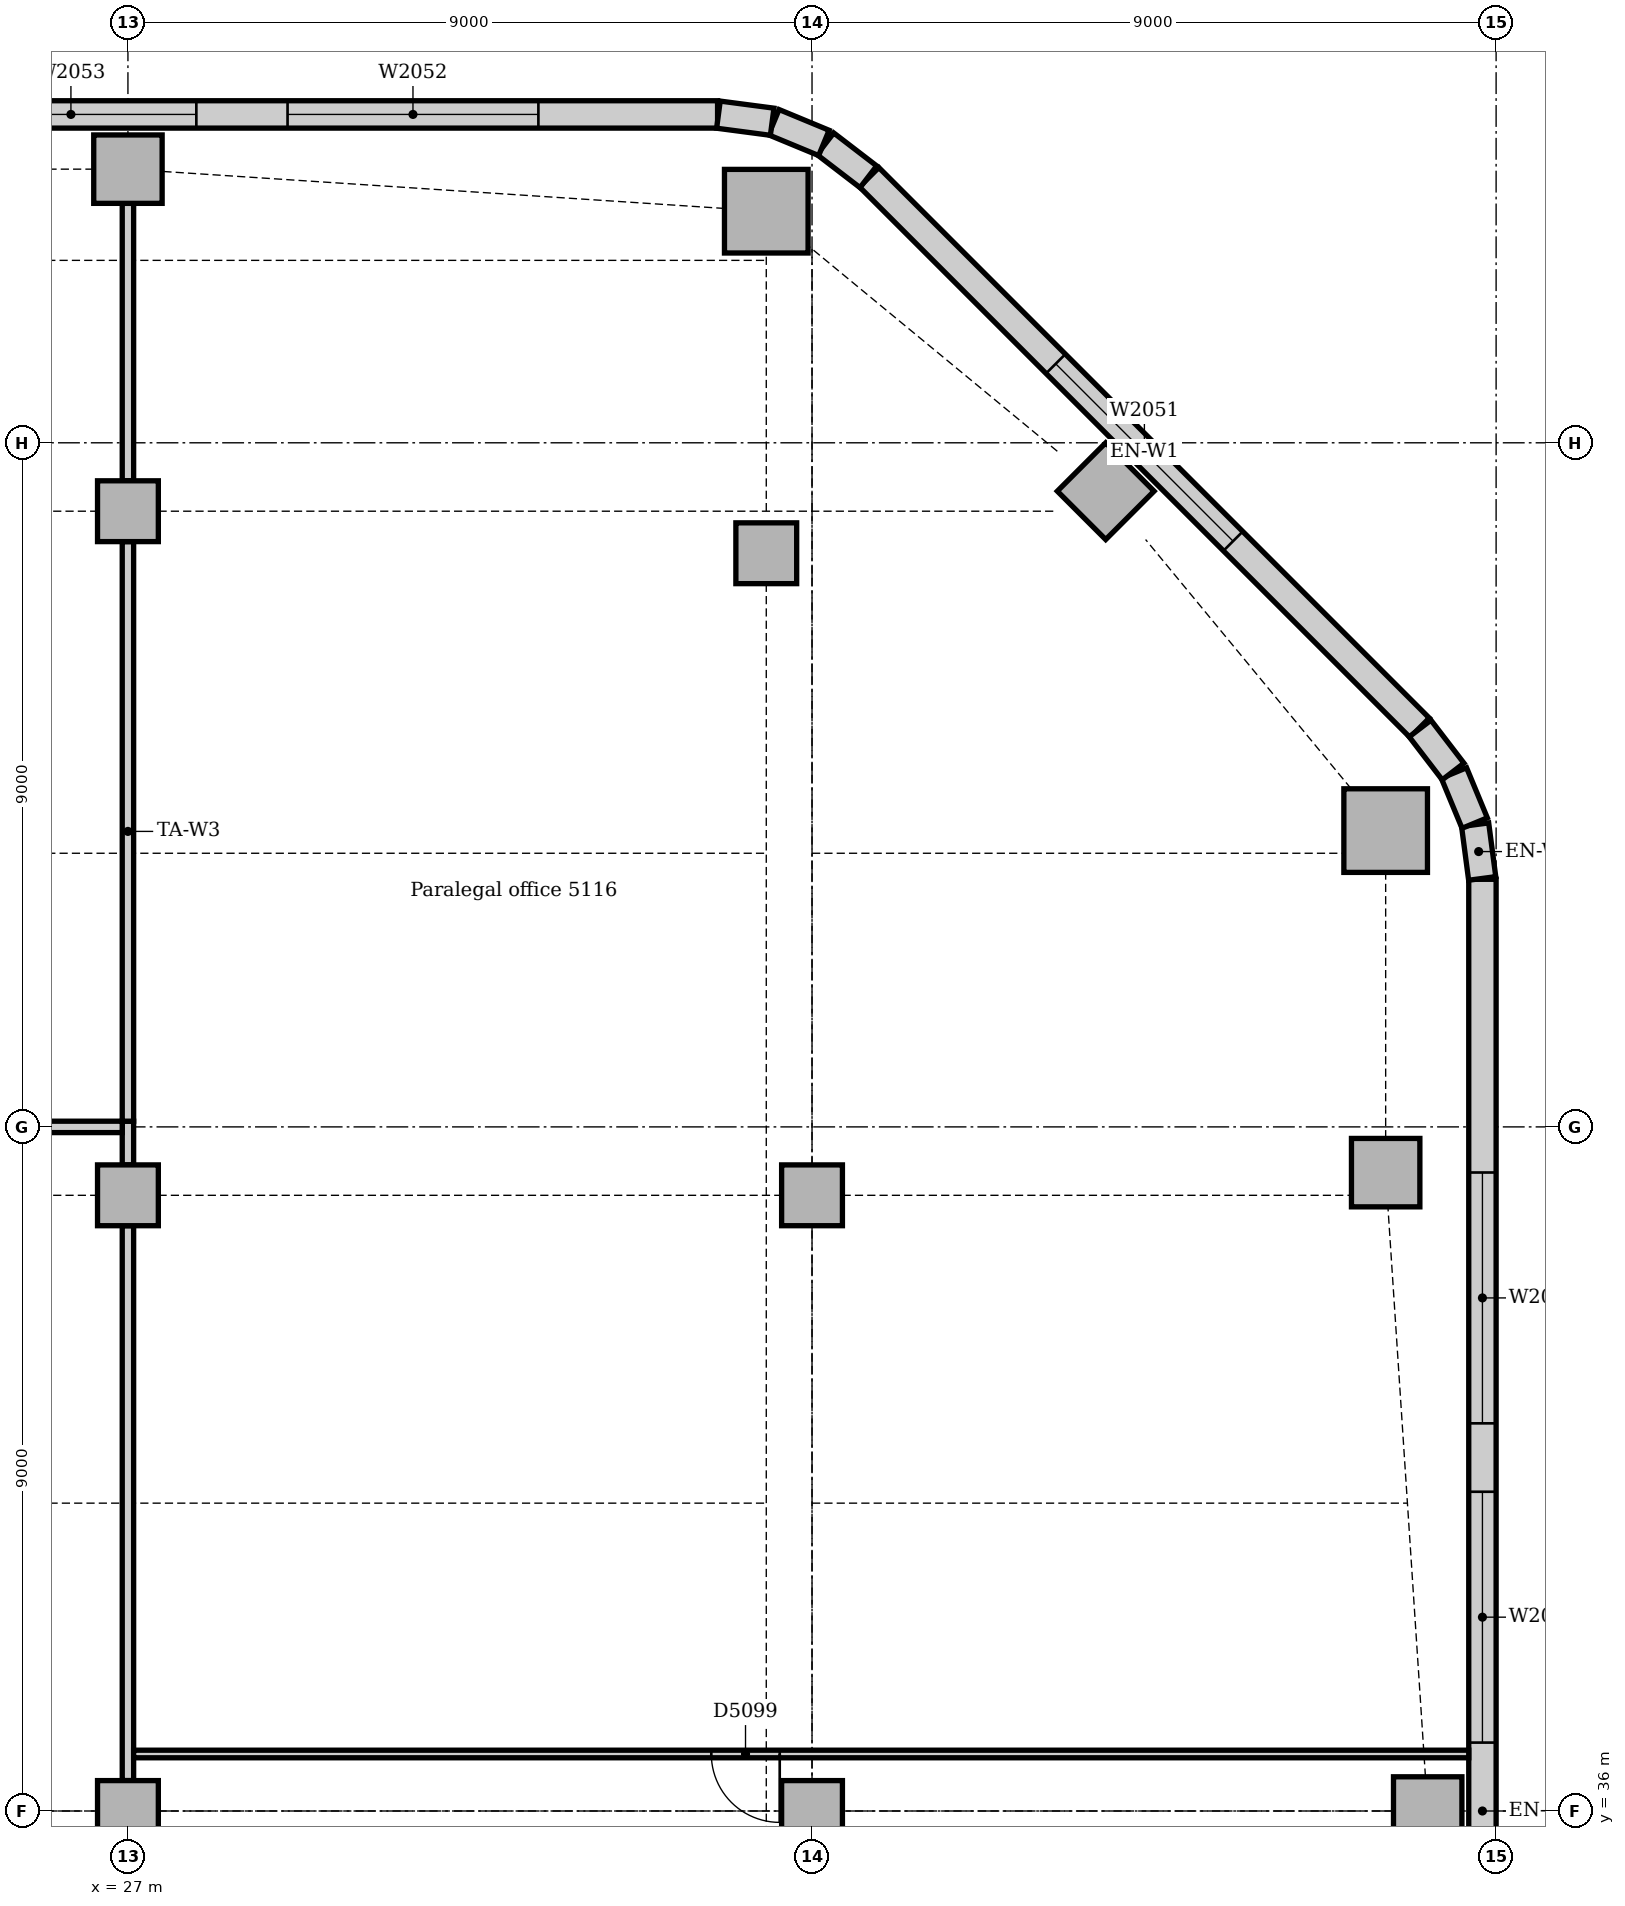
"""IFC4 building model, lengths in metres.
Left out: names, types, materials, properties, quantities, classifications, styles, units other than length and angle.
Written with IfcOpenShell. Run it as: python <this file> out.ifc"""

import sys

from ifc_helpers import new_model, si_unit, direction, frame, frame_2d, origin, origin_2d, place, context, subcontext, project, spatial, rectangle, extrude, element, fill, save


model = new_model("IFC4")
c1 = context("Model", 3, precision=1e-05, world=origin(), true_north=direction((0.0, 1.0)))
c2 = subcontext(c1, "Body", "Model", "MODEL_VIEW")
j1 = project(units=[si_unit("LENGTHUNIT", "METRE"), si_unit("PLANEANGLEUNIT", "RADIAN")], contexts=[c1])
p1 = place(None, origin())
s1 = spatial("IfcSite", under=j1, at=p1, CompositionType="ELEMENT")
p2 = place(p1, origin())
s2 = spatial("IfcBuilding", under=s1, at=p2, CompositionType="ELEMENT")
p3 = place(p2, frame((0.0, 0.0, 214.0)))
s3 = spatial("IfcBuildingStorey", under=s2, at=p3, CompositionType="ELEMENT", Elevation=214.0)
for number, where, z_axis, x_axis in (
    (1, (43.547, 48.898, 0.0), (0.0, 0.0, 1.0), (1.0, 0.0, 0.0)),
    (2, (35.398, 57.047, 0.0), (0.0, 0.0, 1.0), (1.0, 0.0, 0.0)),
):
    element("IfcColumn", number, at=place(p3, frame(where, z_axis=z_axis, x_axis=x_axis)), inside=s3, PredefinedType="COLUMN", context=c2, shape_type="SweptSolid", body=[
        extrude(rectangle(XDim=1.1, YDim=1.1, at=origin_2d()), origin(), (0.0, 0.0, 1.0), 3.85),
    ])
for number, where, z_axis, x_axis in (
    (3, (44.1, 36.0, 0.0), (0.0, 0.0, 1.0), (1.0, 0.0, 0.0)),
    (4, (43.547, 44.398, 0.0), (0.0, 0.0, 1.0), (1.0, 0.0, 0.0)),
    (5, (39.864, 53.364, 0.0), (0.0, 0.0, 1.0), (0.707, 0.707, 0.0)),
    (6, (27.0, 57.6, 0.0), (0.0, 0.0, 1.0), (1.0, 0.0, 0.0)),
):
    element("IfcColumn", number, at=place(p3, frame(where, z_axis=z_axis, x_axis=x_axis)), inside=s3, PredefinedType="COLUMN", context=c2, shape_type="SweptSolid", body=[
        extrude(rectangle(XDim=0.9, YDim=0.9, at=origin_2d()), origin(), (0.0, 0.0, 1.0), 3.85),
    ])
for number, where, z_axis, x_axis in (
    (7, (27.0, 36.0, 0.0), (0.0, 0.0, 1.0), (1.0, 0.0, 0.0)),
    (8, (27.0, 44.1, 0.0), (0.0, 0.0, 1.0), (1.0, 0.0, 0.0)),
    (9, (27.0, 53.1, 0.0), (0.0, 0.0, 1.0), (1.0, 0.0, 0.0)),
    (10, (36.0, 36.0, 0.0), (0.0, 0.0, 1.0), (1.0, 0.0, 0.0)),
    (11, (36.0, 44.1, 0.0), (0.0, 0.0, 1.0), (1.0, 0.0, 0.0)),
    (12, (35.398, 52.547, 0.0), (0.0, 0.0, 1.0), (1.0, 0.0, 0.0)),
):
    element("IfcColumn", number, at=place(p3, frame(where, z_axis=z_axis, x_axis=x_axis)), inside=s3, PredefinedType="COLUMN", context=c2, shape_type="SweptSolid", body=[
        extrude(rectangle(XDim=0.8, YDim=0.8, at=origin_2d()), origin(), (0.0, 0.0, 1.0), 3.85),
    ])
p4 = place(p3, frame((44.82, 23.743, 0.0), z_axis=(0.0, 0.0, 1.0), x_axis=(0.0, 1.0, 0.0)))
e13 = element("IfcWall", 13, at=p4, inside=s3, PredefinedType="STANDARD", context=c2, shape_type="SweptSolid", body=[
    extrude(rectangle(XDim=24.515, YDim=0.36, at=frame_2d((12.257, 0.0))), origin(), (0.0, 0.0, 1.0), 3.85),
])
p5 = place(p4, frame((3.857, 0.0, 0.9)))
e14 = element("IfcOpeningElement", 14, at=p5, cuts=e13, PredefinedType="OPENING", context=c2, shape_type="SweptSolid", body=[
    extrude(rectangle(XDim=3.3, YDim=1.6, at=frame_2d((1.65, 0.8))), frame((0.0, 0.19, 0.0), z_axis=(0.0, -1.0, 0.0), x_axis=(1.0, 0.0, 0.0)), (0.0, 0.0, 1.0), 0.38),
])
p6 = place(p4, frame((8.357, 0.0, 0.9)))
e15 = element("IfcOpeningElement", 15, at=p6, cuts=e13, PredefinedType="OPENING", context=c2, shape_type="SweptSolid", body=[
    extrude(rectangle(XDim=3.3, YDim=1.6, at=frame_2d((1.65, 0.8))), frame((0.0, 0.19, 0.0), z_axis=(0.0, -1.0, 0.0), x_axis=(1.0, 0.0, 0.0)), (0.0, 0.0, 1.0), 0.38),
])
p7 = place(p4, frame((13.157, 0.0, 0.9)))
e16 = element("IfcOpeningElement", 16, at=p7, cuts=e13, PredefinedType="OPENING", context=c2, shape_type="SweptSolid", body=[
    extrude(rectangle(XDim=3.3, YDim=1.6, at=frame_2d((1.65, 0.8))), frame((0.0, 0.19, 0.0), z_axis=(0.0, -1.0, 0.0), x_axis=(1.0, 0.0, 0.0)), (0.0, 0.0, 1.0), 0.38),
])
p8 = place(p4, frame((17.357, 0.0, 0.9)))
e17 = element("IfcOpeningElement", 17, at=p8, cuts=e13, PredefinedType="OPENING", context=c2, shape_type="SweptSolid", body=[
    extrude(rectangle(XDim=3.3, YDim=1.6, at=frame_2d((1.65, 0.8))), frame((0.0, 0.19, 0.0), z_axis=(0.0, -1.0, 0.0), x_axis=(1.0, 0.0, 0.0)), (0.0, 0.0, 1.0), 0.38),
])
p9 = place(p3, frame((43.994, 50.251, 0.0), z_axis=(0.0, 0.0, 1.0), x_axis=(-0.707106781187, 0.707106781187, 0.0)))
e18 = element("IfcWall", 18, at=p9, inside=s3, PredefinedType="STANDARD", context=c2, shape_type="SweptSolid", body=[
    extrude(rectangle(XDim=10.243, YDim=0.36, at=frame_2d((5.121, 0.0))), origin(), (0.0, 0.0, 1.0), 3.85),
])
p10 = place(p9, frame((3.471, 0.0, 0.9)))
e19 = element("IfcOpeningElement", 19, at=p10, cuts=e18, PredefinedType="OPENING", context=c2, shape_type="SweptSolid", body=[
    extrude(rectangle(XDim=3.3, YDim=1.6, at=frame_2d((1.65, 0.8))), frame((0.0, 0.19, 0.0), z_axis=(0.0, -1.0, 0.0), x_axis=(1.0, 0.0, 0.0)), (0.0, 0.0, 1.0), 0.38),
])
p11 = place(p3, frame((34.757, 58.32, 0.0), z_axis=(0.0, 0.0, 1.0), x_axis=(-1.0, 0.0, 0.0)))
e20 = element("IfcWall", 20, at=p11, inside=s3, PredefinedType="STANDARD", context=c2, shape_type="SweptSolid", body=[
    extrude(rectangle(XDim=30.515, YDim=0.36, at=frame_2d((15.257, 0.0))), origin(), (0.0, 0.0, 1.0), 3.85),
])
p12 = place(p11, frame((2.357, 0.0, 0.9)))
e21 = element("IfcOpeningElement", 21, at=p12, cuts=e20, PredefinedType="OPENING", context=c2, shape_type="SweptSolid", body=[
    extrude(rectangle(XDim=3.3, YDim=1.6, at=frame_2d((1.65, 0.8))), frame((0.0, 0.19, 0.0), z_axis=(0.0, -1.0, 0.0), x_axis=(1.0, 0.0, 0.0)), (0.0, 0.0, 1.0), 0.38),
])
p13 = place(p11, frame((6.857, 0.0, 0.9)))
e22 = element("IfcOpeningElement", 22, at=p13, cuts=e20, PredefinedType="OPENING", context=c2, shape_type="SweptSolid", body=[
    extrude(rectangle(XDim=3.3, YDim=1.6, at=frame_2d((1.65, 0.8))), frame((0.0, 0.19, 0.0), z_axis=(0.0, -1.0, 0.0), x_axis=(1.0, 0.0, 0.0)), (0.0, 0.0, 1.0), 0.38),
])
p14 = place(p11, frame((11.357, 0.0, 0.9)))
e23 = element("IfcOpeningElement", 23, at=p14, cuts=e20, PredefinedType="OPENING", context=c2, shape_type="SweptSolid", body=[
    extrude(rectangle(XDim=3.3, YDim=1.6, at=frame_2d((1.65, 0.8))), frame((0.0, 0.19, 0.0), z_axis=(0.0, -1.0, 0.0), x_axis=(1.0, 0.0, 0.0)), (0.0, 0.0, 1.0), 0.38),
])
p15 = place(p11, frame((15.857, 0.0, 0.9)))
e24 = element("IfcOpeningElement", 24, at=p15, cuts=e20, PredefinedType="OPENING", context=c2, shape_type="SweptSolid", body=[
    extrude(rectangle(XDim=3.3, YDim=1.6, at=frame_2d((1.65, 0.8))), frame((0.0, 0.19, 0.0), z_axis=(0.0, -1.0, 0.0), x_axis=(1.0, 0.0, 0.0)), (0.0, 0.0, 1.0), 0.38),
])
p16 = place(p11, frame((20.357, 0.0, 0.9)))
e25 = element("IfcOpeningElement", 25, at=p16, cuts=e20, PredefinedType="OPENING", context=c2, shape_type="SweptSolid", body=[
    extrude(rectangle(XDim=3.3, YDim=1.6, at=frame_2d((1.65, 0.8))), frame((0.0, 0.19, 0.0), z_axis=(0.0, -1.0, 0.0), x_axis=(1.0, 0.0, 0.0)), (0.0, 0.0, 1.0), 0.38),
])
p17 = place(p11, frame((24.857, 0.0, 0.9)))
e26 = element("IfcOpeningElement", 26, at=p17, cuts=e20, PredefinedType="OPENING", context=c2, shape_type="SweptSolid", body=[
    extrude(rectangle(XDim=3.3, YDim=1.6, at=frame_2d((1.65, 0.8))), frame((0.0, 0.19, 0.0), z_axis=(0.0, -1.0, 0.0), x_axis=(1.0, 0.0, 0.0)), (0.0, 0.0, 1.0), 0.38),
])
for number, where, z_axis, x_axis in (
    (27, (44.817, 48.269, 0.0), (0.0, 0.0, 1.0), (-0.131, 0.991, 0.0)),
    (28, (44.718, 48.997, 0.0), (0.0, 0.0, 1.0), (-0.383, 0.924, 0.0)),
):
    element("IfcWall", number, at=place(p3, frame(where, z_axis=z_axis, x_axis=x_axis)), inside=s3, PredefinedType="STANDARD", context=c2, shape_type="SweptSolid", body=[
        extrude(rectangle(XDim=0.713, YDim=0.36, at=frame_2d((0.356, 0.0))), origin(), (0.0, 0.0, 1.0), 3.85),
    ])
for number, where, z_axis, x_axis in (
    (29, (44.434, 49.675, 0.0), (0.0, 0.0, 1.0), (-0.609, 0.793, 0.0)),
    (30, (36.741, 57.5, 0.0), (0.0, 0.0, 1.0), (-0.793, 0.609, 0.0)),
):
    element("IfcWall", number, at=place(p3, frame(where, z_axis=z_axis, x_axis=x_axis)), inside=s3, PredefinedType="STANDARD", context=c2, shape_type="SweptSolid", body=[
        extrude(rectangle(XDim=0.713, YDim=0.36, at=frame_2d((0.357, 0.0))), origin(), (0.0, 0.0, 1.0), 3.85),
    ])
for number, where, z_axis, x_axis in (
    (31, (36.156, 57.945, 0.0), (0.0, 0.0, 1.0), (-0.924, 0.383, 0.0)),
    (32, (35.476, 58.224, 0.0), (0.0, 0.0, 1.0), (-0.991, 0.131, 0.0)),
):
    element("IfcWall", number, at=place(p3, frame(where, z_axis=z_axis, x_axis=x_axis)), inside=s3, PredefinedType="STANDARD", context=c2, shape_type="SweptSolid", body=[
        extrude(rectangle(XDim=0.713, YDim=0.36, at=frame_2d((0.356, 0.0))), origin(), (0.0, 0.0, 1.0), 3.85),
    ])
p18 = place(p3, frame((27.0, 36.4, 0.0), z_axis=(0.0, 0.0, 1.0), x_axis=(0.0, 1.0, 0.0)))
e33 = element("IfcWall", 33, at=p18, inside=s3, PredefinedType="PARTITIONING", context=c2, shape_type="SweptSolid", body=[
    extrude(rectangle(XDim=7.3, YDim=0.15, at=frame_2d((3.65, 0.0))), origin(), (0.0, 0.0, 1.0), 3.35),
])
p19 = place(p3, frame((27.0, 44.5, 0.0), z_axis=(0.0, 0.0, 1.0), x_axis=(0.0, 1.0, 0.0)))
e34 = element("IfcWall", 34, at=p19, inside=s3, PredefinedType="PARTITIONING", context=c2, shape_type="SweptSolid", body=[
    extrude(rectangle(XDim=0.575, YDim=0.15, at=frame_2d((0.287, 0.0))), origin(), (0.0, 0.0, 1.0), 3.35),
])
p20 = place(p3, frame((22.425, 45.0, 0.0), z_axis=(0.0, 0.0, 1.0), x_axis=(1.0, 0.0, 0.0)))
e35 = element("IfcWall", 35, at=p20, inside=s3, PredefinedType="PARTITIONING", context=c2, shape_type="SweptSolid", body=[
    extrude(rectangle(XDim=4.5, YDim=0.15, at=frame_2d((2.25, 0.0))), origin(), (0.0, 0.0, 1.0), 3.85),
])
p21 = place(p20, frame((1.75, 0.0, 0.0)))
e36 = element("IfcOpeningElement", 36, at=p21, cuts=e35, PredefinedType="OPENING", context=c2, shape_type="SweptSolid", body=[
    extrude(rectangle(XDim=1.0, YDim=2.1, at=frame_2d((0.5, 1.05))), frame((0.0, 0.085, 0.0), z_axis=(0.0, -1.0, 0.0), x_axis=(1.0, 0.0, 0.0)), (0.0, 0.0, 1.0), 0.17),
])
p22 = place(p3, frame((27.0, 45.075, 0.0), z_axis=(0.0, 0.0, 1.0), x_axis=(0.0, 1.0, 0.0)))
e37 = element("IfcWall", 37, at=p22, inside=s3, PredefinedType="PARTITIONING", context=c2, shape_type="SweptSolid", body=[
    extrude(rectangle(XDim=7.625, YDim=0.15, at=frame_2d((3.812, 0.0))), origin(), (0.0, 0.0, 1.0), 3.35),
])
p23 = place(p3, frame((27.0, 53.5, 0.0), z_axis=(0.0, 0.0, 1.0), x_axis=(0.0, 1.0, 0.0)))
e38 = element("IfcWall", 38, at=p23, inside=s3, PredefinedType="PARTITIONING", context=c2, shape_type="SweptSolid", body=[
    extrude(rectangle(XDim=3.65, YDim=0.15, at=frame_2d((1.825, 0.0))), origin(), (0.0, 0.0, 1.0), 3.41),
])
p24 = place(p3, frame((27.075, 36.75, 0.0), z_axis=(0.0, 0.0, 1.0), x_axis=(1.0, 0.0, 0.0)))
e39 = element("IfcWall", 39, at=p24, inside=s3, PredefinedType="PARTITIONING", context=c2, shape_type="SweptSolid", body=[
    extrude(rectangle(XDim=17.565, YDim=0.1, at=frame_2d((8.783, 0.0))), origin(), (0.0, 0.0, 1.0), 3.85),
])
p25 = place(p24, frame((7.6, 0.0, 0.0)))
e40 = element("IfcOpeningElement", 40, at=p25, cuts=e39, PredefinedType="OPENING", context=c2, shape_type="SweptSolid", body=[
    extrude(rectangle(XDim=0.9, YDim=2.1, at=frame_2d((0.45, 1.05))), frame((0.0, 0.06, 0.0), z_axis=(0.0, -1.0, 0.0), x_axis=(1.0, 0.0, 0.0)), (0.0, 0.0, 1.0), 0.12),
])
p26 = place(p7, origin())
e41 = element("IfcWindow", 41, at=p26, inside=s3, PartitioningType="SINGLE_PANEL", PredefinedType="WINDOW", context=c2, shape_type="SweptSolid", body=[
    extrude(rectangle(XDim=3.3, YDim=1.6, at=frame_2d((1.65, 0.8))), frame((0.0, 0.13, 0.0), z_axis=(0.0, -1.0, 0.0), x_axis=(1.0, 0.0, 0.0)), (0.0, 0.0, 1.0), 0.06),
])
fill(e16, e41)
p27 = place(p8, origin())
e42 = element("IfcWindow", 42, at=p27, inside=s3, PartitioningType="SINGLE_PANEL", PredefinedType="WINDOW", context=c2, shape_type="SweptSolid", body=[
    extrude(rectangle(XDim=3.3, YDim=1.6, at=frame_2d((1.65, 0.8))), frame((0.0, 0.13, 0.0), z_axis=(0.0, -1.0, 0.0), x_axis=(1.0, 0.0, 0.0)), (0.0, 0.0, 1.0), 0.06),
])
fill(e17, e42)
p28 = place(p10, origin())
e43 = element("IfcWindow", 43, at=p28, inside=s3, PartitioningType="SINGLE_PANEL", PredefinedType="WINDOW", context=c2, shape_type="SweptSolid", body=[
    extrude(rectangle(XDim=3.3, YDim=1.6, at=frame_2d((1.65, 0.8))), frame((0.0, 0.13, 0.0), z_axis=(0.0, -1.0, 0.0), x_axis=(1.0, 0.0, 0.0)), (0.0, 0.0, 1.0), 0.06),
])
fill(e19, e43)
p29 = place(p12, origin())
e44 = element("IfcWindow", 44, at=p29, inside=s3, PartitioningType="SINGLE_PANEL", PredefinedType="WINDOW", context=c2, shape_type="SweptSolid", body=[
    extrude(rectangle(XDim=3.3, YDim=1.6, at=frame_2d((1.65, 0.8))), frame((0.0, 0.13, 0.0), z_axis=(0.0, -1.0, 0.0), x_axis=(1.0, 0.0, 0.0)), (0.0, 0.0, 1.0), 0.06),
])
fill(e21, e44)
p30 = place(p13, origin())
e45 = element("IfcWindow", 45, at=p30, inside=s3, PartitioningType="SINGLE_PANEL", PredefinedType="WINDOW", context=c2, shape_type="SweptSolid", body=[
    extrude(rectangle(XDim=3.3, YDim=1.6, at=frame_2d((1.65, 0.8))), frame((0.0, 0.13, 0.0), z_axis=(0.0, -1.0, 0.0), x_axis=(1.0, 0.0, 0.0)), (0.0, 0.0, 1.0), 0.06),
])
fill(e22, e45)
p31 = place(p25, frame((0.9, 0.0, 0.0), z_axis=(0.0, 0.0, 1.0), x_axis=(-1.0, 0.0, 0.0)))
e46 = element("IfcDoor", 46, at=p31, inside=s3, OperationType="SINGLE_SWING_LEFT", PredefinedType="DOOR", context=c2, shape_type="SweptSolid", body=[
    extrude(rectangle(XDim=0.9, YDim=2.1, at=frame_2d((0.45, 1.05))), frame((0.0, 0.025, 0.0), z_axis=(0.0, -1.0, 0.0), x_axis=(1.0, 0.0, 0.0)), (0.0, 0.0, 1.0), 0.05),
])
fill(e40, e46)
save(model, sys.argv[1])
